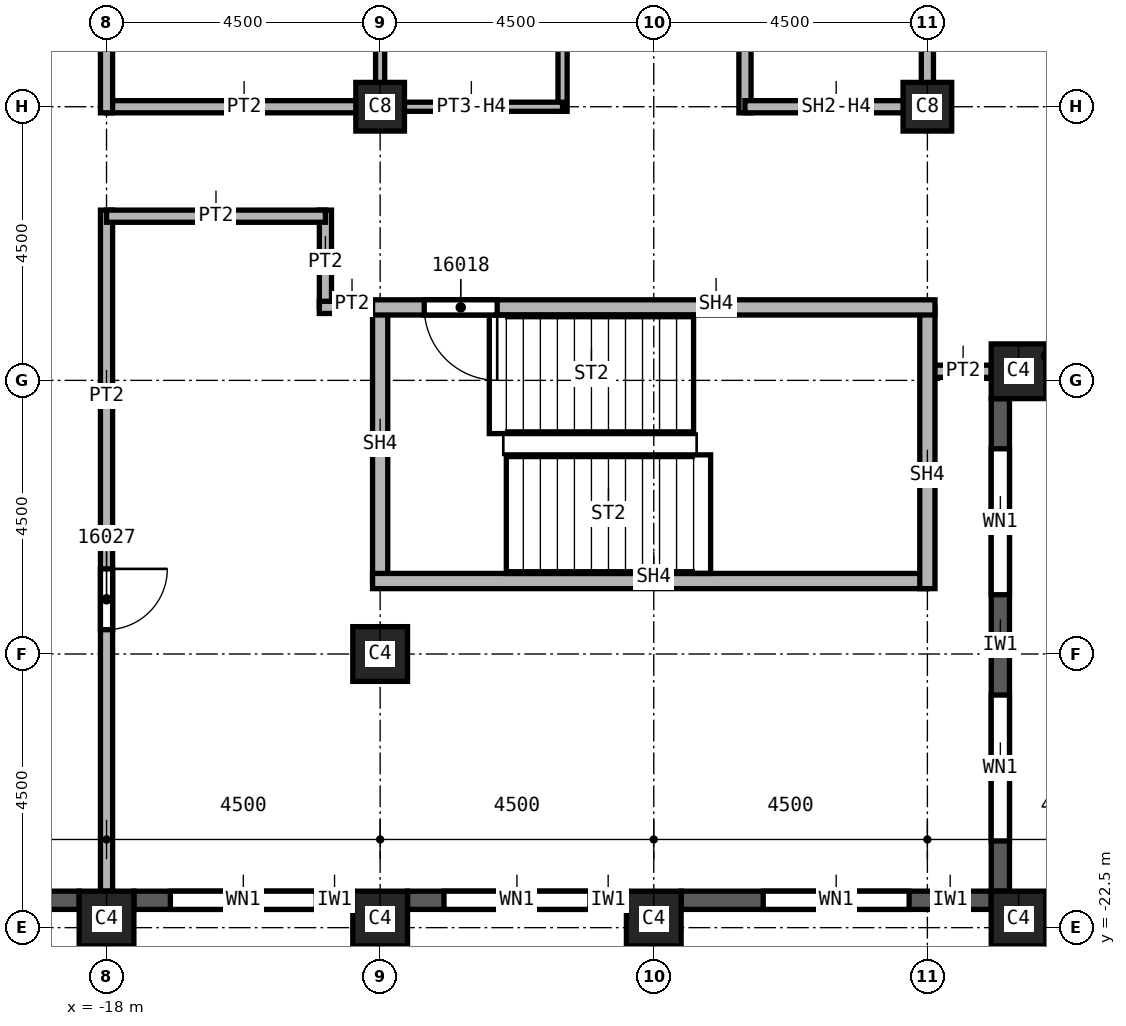
"""IFC4 building model, lengths in metres.
Left out: names, types, materials, properties, quantities, classifications, styles, units other than length and angle.
Written with IfcOpenShell. Run it as: python <this file> out.ifc"""

import sys

from ifc_helpers import new_model, si_unit, direction, frame, frame_2d, origin, origin_2d, place, context, subcontext, project, spatial, rectangle, extrude, element, fill, save


model = new_model("IFC4")
c1 = context("Model", 3, precision=1e-05, world=origin(), true_north=direction((0.0, 1.0)))
c2 = subcontext(c1, "Body", "Model", "MODEL_VIEW")
j1 = project(units=[si_unit("LENGTHUNIT", "METRE"), si_unit("PLANEANGLEUNIT", "RADIAN")], contexts=[c1])
p1 = place(None, origin())
s1 = spatial("IfcSite", under=j1, at=p1, CompositionType="ELEMENT")
p2 = place(p1, origin())
s2 = spatial("IfcBuilding", under=s1, at=p2, CompositionType="ELEMENT")
p3 = place(p2, frame((0.0, 0.0, 246.0)))
s3 = spatial("IfcBuildingStorey", under=s2, at=p3, CompositionType="ELEMENT", Elevation=246.0)
p4 = place(p3, frame((-13.5, -18.0, 0.0), z_axis=(0.0, 0.0, 1.0), x_axis=(1.0, 0.0, 0.0)))
e1 = element("IfcColumn", 1, at=p4, inside=s3, PredefinedType="COLUMN", context=c2, shape_type="SweptSolid", body=[
    extrude(rectangle(XDim=0.9, YDim=0.9, at=origin_2d()), origin(), (0.0, 0.0, 1.0), 3.72),
])
for number, where, z_axis, x_axis in (
    (2, (-4.5, -9.0, 0.0), (0.0, 0.0, 1.0), (1.0, 0.0, 0.0)),
    (3, (-13.5, -9.0, 0.0), (0.0, 0.0, 1.0), (1.0, 0.0, 0.0)),
):
    element("IfcColumn", number, at=place(p3, frame(where, z_axis=z_axis, x_axis=x_axis)), inside=s3, PredefinedType="COLUMN", context=c2, shape_type="SweptSolid", body=[
        extrude(rectangle(XDim=0.8, YDim=0.8, at=origin_2d()), origin(), (0.0, 0.0, 1.0), 3.72),
    ])
for number, where, z_axis, x_axis in (
    (4, (-3.0, -22.35, 0.0), (0.0, 0.0, 1.0), (1.0, 0.0, 0.0)),
    (5, (-9.0, -22.35, 0.0), (0.0, 0.0, 1.0), (1.0, 0.0, 0.0)),
    (6, (-13.5, -22.35, 0.0), (0.0, 0.0, 1.0), (1.0, 0.0, 0.0)),
    (7, (-18.0, -22.35, 0.0), (0.0, 0.0, 1.0), (1.0, 0.0, 0.0)),
    (8, (-3.0, -13.35, 0.0), (0.0, 0.0, 1.0), (1.0, 0.0, 0.0)),
):
    element("IfcColumn", number, at=place(p3, frame(where, z_axis=z_axis, x_axis=x_axis)), inside=s3, PredefinedType="COLUMN", context=c2, shape_type="SweptSolid", body=[
        extrude(rectangle(XDim=0.9, YDim=0.9, at=origin_2d()), origin(), (0.0, 0.0, 1.0), 3.72),
    ])
p5 = place(p3, frame((-22.05, -22.05, 0.0), z_axis=(0.0, 0.0, 1.0), x_axis=(1.0, 0.0, 0.0)))
e9 = element("IfcWall", 9, at=p5, inside=s3, PredefinedType="SOLIDWALL", context=c2, shape_type="SweptSolid", body=[
    extrude(rectangle(XDim=3.6, YDim=0.3, at=frame_2d((1.8, 0.0))), origin(), (0.0, 0.0, 1.0), 3.12),
])
p6 = place(p5, frame((0.775, 0.0, 0.8)))
e10 = element("IfcOpeningElement", 10, at=p6, cuts=e9, PredefinedType="OPENING", context=c2, shape_type="SweptSolid", body=[
    extrude(rectangle(XDim=1.0, YDim=1.95, at=frame_2d((0.5, 0.975))), frame((0.0, 0.15, 0.0), z_axis=(0.0, -1.0, 0.0), x_axis=(1.0, 0.0, 0.0)), (0.0, 0.0, 1.0), 0.3),
])
p7 = place(p5, frame((2.375, 0.0, 0.8)))
e11 = element("IfcOpeningElement", 11, at=p7, cuts=e9, PredefinedType="OPENING", context=c2, shape_type="SweptSolid", body=[
    extrude(rectangle(XDim=0.6, YDim=1.95, at=frame_2d((0.3, 0.975))), frame((0.0, 0.15, 0.0), z_axis=(0.0, -1.0, 0.0), x_axis=(1.0, 0.0, 0.0)), (0.0, 0.0, 1.0), 0.3),
])
p8 = place(p3, frame((-17.55, -22.05, 0.0), z_axis=(0.0, 0.0, 1.0), x_axis=(1.0, 0.0, 0.0)))
e12 = element("IfcWall", 12, at=p8, inside=s3, PredefinedType="SOLIDWALL", context=c2, shape_type="SweptSolid", body=[
    extrude(rectangle(XDim=3.6, YDim=0.3, at=frame_2d((1.8, 0.0))), origin(), (0.0, 0.0, 1.0), 3.12),
])
p9 = place(p8, frame((0.6, 0.0, 0.8)))
e13 = element("IfcOpeningElement", 13, at=p9, cuts=e12, PredefinedType="OPENING", context=c2, shape_type="SweptSolid", body=[
    extrude(rectangle(XDim=2.4, YDim=1.95, at=frame_2d((1.2, 0.975))), frame((0.0, 0.15, 0.0), z_axis=(0.0, -1.0, 0.0), x_axis=(1.0, 0.0, 0.0)), (0.0, 0.0, 1.0), 0.3),
])
p10 = place(p3, frame((-13.05, -22.05, 0.0), z_axis=(0.0, 0.0, 1.0), x_axis=(1.0, 0.0, 0.0)))
e14 = element("IfcWall", 14, at=p10, inside=s3, PredefinedType="SOLIDWALL", context=c2, shape_type="SweptSolid", body=[
    extrude(rectangle(XDim=3.6, YDim=0.3, at=frame_2d((1.8, 0.0))), origin(), (0.0, 0.0, 1.0), 3.12),
])
p11 = place(p10, frame((0.6, 0.0, 0.8)))
e15 = element("IfcOpeningElement", 15, at=p11, cuts=e14, PredefinedType="OPENING", context=c2, shape_type="SweptSolid", body=[
    extrude(rectangle(XDim=2.4, YDim=1.95, at=frame_2d((1.2, 0.975))), frame((0.0, 0.15, 0.0), z_axis=(0.0, -1.0, 0.0), x_axis=(1.0, 0.0, 0.0)), (0.0, 0.0, 1.0), 0.3),
])
p12 = place(p3, frame((-8.55, -22.05, 0.0), z_axis=(0.0, 0.0, 1.0), x_axis=(1.0, 0.0, 0.0)))
e16 = element("IfcWall", 16, at=p12, inside=s3, PredefinedType="SOLIDWALL", context=c2, shape_type="SweptSolid", body=[
    extrude(rectangle(XDim=5.1, YDim=0.3, at=frame_2d((2.55, 0.0))), origin(), (0.0, 0.0, 1.0), 3.12),
])
p13 = place(p12, frame((1.35, 0.0, 0.8)))
e17 = element("IfcOpeningElement", 17, at=p13, cuts=e16, PredefinedType="OPENING", context=c2, shape_type="SweptSolid", body=[
    extrude(rectangle(XDim=2.4, YDim=1.95, at=frame_2d((1.2, 0.975))), frame((0.0, 0.15, 0.0), z_axis=(0.0, -1.0, 0.0), x_axis=(1.0, 0.0, 0.0)), (0.0, 0.0, 1.0), 0.3),
])
p14 = place(p3, frame((-3.3, -21.9, 0.0), z_axis=(0.0, 0.0, 1.0), x_axis=(0.0, 1.0, 0.0)))
e18 = element("IfcWall", 18, at=p14, inside=s3, PredefinedType="SOLIDWALL", context=c2, shape_type="SweptSolid", body=[
    extrude(rectangle(XDim=8.1, YDim=0.3, at=frame_2d((4.05, 0.0))), origin(), (0.0, 0.0, 1.0), 3.12),
])
p15 = place(p14, frame((0.825, 0.0, 0.8)))
e19 = element("IfcOpeningElement", 19, at=p15, cuts=e18, PredefinedType="OPENING", context=c2, shape_type="SweptSolid", body=[
    extrude(rectangle(XDim=2.4, YDim=1.95, at=frame_2d((1.2, 0.975))), frame((0.0, 0.15, 0.0), z_axis=(0.0, -1.0, 0.0), x_axis=(1.0, 0.0, 0.0)), (0.0, 0.0, 1.0), 0.3),
])
p16 = place(p14, frame((4.875, 0.0, 0.8)))
e20 = element("IfcOpeningElement", 20, at=p16, cuts=e18, PredefinedType="OPENING", context=c2, shape_type="SweptSolid", body=[
    extrude(rectangle(XDim=2.4, YDim=1.95, at=frame_2d((1.2, 0.975))), frame((0.0, 0.15, 0.0), z_axis=(0.0, -1.0, 0.0), x_axis=(1.0, 0.0, 0.0)), (0.0, 0.0, 1.0), 0.3),
])
p17 = place(p3, frame((-18.0, -10.7, 0.0), z_axis=(0.0, 0.0, 1.0), x_axis=(0.0, -1.0, 0.0)))
e21 = element("IfcWall", 21, at=p17, inside=s3, PredefinedType="PARTITIONING", context=c2, shape_type="SweptSolid", body=[
    extrude(rectangle(XDim=11.2, YDim=0.2, at=frame_2d((5.6, 0.0))), origin(), (0.0, 0.0, 1.0), 3.72),
])
p18 = place(p17, frame((5.9, 0.0, 0.0)))
e22 = element("IfcOpeningElement", 22, at=p18, cuts=e21, PredefinedType="OPENING", context=c2, shape_type="SweptSolid", body=[
    extrude(rectangle(XDim=1.0, YDim=2.1, at=frame_2d((0.5, 1.05))), frame((0.0, 0.1, 0.0), z_axis=(0.0, -1.0, 0.0), x_axis=(1.0, 0.0, 0.0)), (0.0, 0.0, 1.0), 0.2),
])
p19 = place(p3, frame((-18.0, -9.0, 0.0), z_axis=(0.0, 0.0, 1.0), x_axis=(1.0, 0.0, 0.0)))
e23 = element("IfcWall", 23, at=p19, inside=s3, PredefinedType="PARTITIONING", context=c2, shape_type="SweptSolid", body=[
    extrude(rectangle(XDim=4.5, YDim=0.2, at=frame_2d((2.25, 0.0))), origin(), (0.0, 0.0, 1.0), 3.72),
])
p20 = place(p3, frame((-18.0, 9.1, 0.0), z_axis=(0.0, 0.0, 1.0), x_axis=(0.0, -1.0, 0.0)))
e24 = element("IfcWall", 24, at=p20, inside=s3, PredefinedType="PARTITIONING", context=c2, shape_type="SweptSolid", body=[
    extrude(rectangle(XDim=18.2, YDim=0.2, at=frame_2d((9.1, 0.0))), origin(), (0.0, 0.0, 1.0), 3.72),
])
p21 = place(p20, frame((11.05, 0.0, 0.0)))
e25 = element("IfcOpeningElement", 25, at=p21, cuts=e24, PredefinedType="OPENING", context=c2, shape_type="SweptSolid", body=[
    extrude(rectangle(XDim=1.0, YDim=2.1, at=frame_2d((0.5, 1.05))), frame((0.0, 0.1, 0.0), z_axis=(0.0, -1.0, 0.0), x_axis=(1.0, 0.0, 0.0)), (0.0, 0.0, 1.0), 0.2),
])
p22 = place(p20, frame((1.15, 0.0, 0.0)))
e26 = element("IfcOpeningElement", 26, at=p22, cuts=e24, PredefinedType="OPENING", context=c2, shape_type="SweptSolid", body=[
    extrude(rectangle(XDim=1.0, YDim=2.1, at=frame_2d((0.5, 1.05))), frame((0.0, 0.1, 0.0), z_axis=(0.0, -1.0, 0.0), x_axis=(1.0, 0.0, 0.0)), (0.0, 0.0, 1.0), 0.2),
])
p23 = place(p3, frame((-14.4, -12.3, 0.0), z_axis=(0.0, 0.0, 1.0), x_axis=(0.0, 1.0, 0.0)))
e27 = element("IfcWall", 27, at=p23, inside=s3, PredefinedType="PARTITIONING", context=c2, shape_type="SweptSolid", body=[
    extrude(rectangle(XDim=1.6, YDim=0.2, at=frame_2d((0.8, 0.0))), origin(), (0.0, 0.0, 1.0), 3.72),
])
p24 = place(p3, frame((-14.4, -10.8, 0.0), z_axis=(0.0, 0.0, 1.0), x_axis=(-1.0, 0.0, 0.0)))
e28 = element("IfcWall", 28, at=p24, inside=s3, PredefinedType="PARTITIONING", context=c2, shape_type="SweptSolid", body=[
    extrude(rectangle(XDim=3.6, YDim=0.2, at=frame_2d((1.8, 0.0))), origin(), (0.0, 0.0, 1.0), 3.72),
])
p25 = place(p3, frame((-13.375, -12.3, 0.0), z_axis=(0.0, 0.0, 1.0), x_axis=(-1.0, 0.0, 0.0)))
e29 = element("IfcWall", 29, at=p25, inside=s3, PredefinedType="PARTITIONING", context=c2, shape_type="SweptSolid", body=[
    extrude(rectangle(XDim=1.125, YDim=0.2, at=frame_2d((0.562, 0.0))), origin(), (0.0, 0.0, 1.0), 3.72),
])
p26 = place(p3, frame((-3.45, -13.35, 0.0), z_axis=(0.0, 0.0, 1.0), x_axis=(-1.0, 0.0, 0.0)))
e30 = element("IfcWall", 30, at=p26, inside=s3, PredefinedType="PARTITIONING", context=c2, shape_type="SweptSolid", body=[
    extrude(rectangle(XDim=1.05, YDim=0.2, at=frame_2d((0.525, 0.0))), origin(), (0.0, 0.0, 1.0), 3.72),
])
p27 = place(p3, frame((-7.5, -9.1, 0.0), z_axis=(0.0, 0.0, 1.0), x_axis=(0.0, 1.0, 0.0)))
e31 = element("IfcWall", 31, at=p27, inside=s3, PredefinedType="SOLIDWALL", context=c2, shape_type="SweptSolid", body=[
    extrude(rectangle(XDim=6.225, YDim=0.2, at=frame_2d((3.113, 0.0))), origin(), (0.0, 0.0, 1.0), 3.72),
])
p28 = place(p3, frame((-4.5, -9.0, 0.0), z_axis=(0.0, 0.0, 1.0), x_axis=(-1.0, 0.0, 0.0)))
e32 = element("IfcWall", 32, at=p28, inside=s3, PredefinedType="SOLIDWALL", context=c2, shape_type="SweptSolid", body=[
    extrude(rectangle(XDim=3.0, YDim=0.2, at=frame_2d((1.5, 0.0))), origin(), (0.0, 0.0, 1.0), 3.042),
])
p29 = place(p3, frame((-4.5, 0.0, 0.0), z_axis=(0.0, 0.0, 1.0), x_axis=(0.0, -1.0, 0.0)))
e33 = element("IfcWall", 33, at=p29, inside=s3, PredefinedType="SOLIDWALL", context=c2, shape_type="SweptSolid", body=[
    extrude(rectangle(XDim=9.1, YDim=0.2, at=frame_2d((4.55, 0.0))), origin(), (0.0, 0.0, 1.0), 3.042),
])
p30 = place(p29, frame((6.25, 0.0, 0.0)))
e34 = element("IfcOpeningElement", 34, at=p30, cuts=e33, PredefinedType="OPENING", context=c2, shape_type="SweptSolid", body=[
    extrude(rectangle(XDim=1.1, YDim=2.1, at=frame_2d((0.55, 1.05))), frame((0.0, 0.1, 0.0), z_axis=(0.0, -1.0, 0.0), x_axis=(1.0, 0.0, 0.0)), (0.0, 0.0, 1.0), 0.2),
])
p31 = place(p29, frame((4.6, 0.0, 0.0)))
e35 = element("IfcOpeningElement", 35, at=p31, cuts=e33, PredefinedType="OPENING", context=c2, shape_type="SweptSolid", body=[
    extrude(rectangle(XDim=1.1, YDim=2.1, at=frame_2d((0.55, 1.05))), frame((0.0, 0.1, 0.0), z_axis=(0.0, -1.0, 0.0), x_axis=(1.0, 0.0, 0.0)), (0.0, 0.0, 1.0), 0.2),
])
p32 = place(p3, frame((-13.5, -16.8, 0.0), z_axis=(0.0, 0.0, 1.0), x_axis=(0.0, 1.0, 0.0)))
e36 = element("IfcWall", 36, at=p32, inside=s3, PredefinedType="SOLIDWALL", context=c2, shape_type="SweptSolid", body=[
    extrude(rectangle(XDim=4.5, YDim=0.25, at=frame_2d((2.25, 0.0))), origin(), (0.0, 0.0, 1.0), 3.72),
])
p33 = place(p3, frame((-4.5, -16.8, 0.0), z_axis=(0.0, 0.0, 1.0), x_axis=(-1.0, 0.0, 0.0)))
e37 = element("IfcWall", 37, at=p33, inside=s3, PredefinedType="SOLIDWALL", context=c2, shape_type="SweptSolid", body=[
    extrude(rectangle(XDim=9.125, YDim=0.25, at=frame_2d((4.562, 0.0))), origin(), (0.0, 0.0, 1.0), 3.72),
])
p34 = place(p3, frame((-4.5, -12.3, 0.0), z_axis=(0.0, 0.0, 1.0), x_axis=(0.0, -1.0, 0.0)))
e38 = element("IfcWall", 38, at=p34, inside=s3, PredefinedType="SOLIDWALL", context=c2, shape_type="SweptSolid", body=[
    extrude(rectangle(XDim=4.625, YDim=0.25, at=frame_2d((2.312, 0.0))), origin(), (0.0, 0.0, 1.0), 3.72),
])
p35 = place(p3, frame((-4.375, -12.3, 0.0), z_axis=(0.0, 0.0, 1.0), x_axis=(-1.0, 0.0, 0.0)))
e39 = element("IfcWall", 39, at=p35, inside=s3, PredefinedType="SOLIDWALL", context=c2, shape_type="SweptSolid", body=[
    extrude(rectangle(XDim=9.25, YDim=0.25, at=frame_2d((4.625, 0.0))), origin(), (0.0, 0.0, 1.0), 3.72),
])
p36 = place(p35, frame((7.2, 0.0, 0.0)))
e40 = element("IfcOpeningElement", 40, at=p36, cuts=e39, PredefinedType="OPENING", context=c2, shape_type="SweptSolid", body=[
    extrude(rectangle(XDim=1.2, YDim=2.1, at=frame_2d((0.6, 1.05))), frame((0.0, 0.125, 0.0), z_axis=(0.0, -1.0, 0.0), x_axis=(1.0, 0.0, 0.0)), (0.0, 0.0, 1.0), 0.25),
])
p37 = place(p3, frame((-13.5, -9.1, 0.0), z_axis=(0.0, 0.0, 1.0), x_axis=(0.0, 1.0, 0.0)))
e41 = element("IfcWall", 41, at=p37, inside=s3, PredefinedType="PARTITIONING", context=c2, shape_type="SweptSolid", body=[
    extrude(rectangle(XDim=4.1, YDim=0.15, at=frame_2d((2.05, 0.0))), origin(), (0.0, 0.0, 1.0), 3.042),
])
p38 = place(p3, frame((-10.5, -9.075, 0.0), z_axis=(0.0, 0.0, 1.0), x_axis=(0.0, 1.0, 0.0)))
e42 = element("IfcWall", 42, at=p38, inside=s3, PredefinedType="PARTITIONING", context=c2, shape_type="SweptSolid", body=[
    extrude(rectangle(XDim=4.15, YDim=0.15, at=frame_2d((2.075, 0.0))), origin(), (0.0, 0.0, 1.0), 3.72),
])
p39 = place(p38, frame((2.5, 0.0, 0.0)))
e43 = element("IfcOpeningElement", 43, at=p39, cuts=e42, PredefinedType="OPENING", context=c2, shape_type="SweptSolid", body=[
    extrude(rectangle(XDim=0.9, YDim=2.1, at=frame_2d((0.45, 1.05))), frame((0.0, 0.075, 0.0), z_axis=(0.0, -1.0, 0.0), x_axis=(1.0, 0.0, 0.0)), (0.0, 0.0, 1.0), 0.15),
])
p40 = place(p3, frame((-10.5, -9.0, 0.0), z_axis=(0.0, 0.0, 1.0), x_axis=(-1.0, 0.0, 0.0)))
e44 = element("IfcWall", 44, at=p40, inside=s3, PredefinedType="PARTITIONING", context=c2, shape_type="SweptSolid", body=[
    extrude(rectangle(XDim=3.075, YDim=0.15, at=frame_2d((1.538, 0.0))), origin(), (0.0, 0.0, 1.0), 3.042),
])
p41 = place(p9, origin())
e45 = element("IfcWindow", 45, at=p41, inside=s3, PartitioningType="SINGLE_PANEL", PredefinedType="WINDOW", context=c2, shape_type="SweptSolid", body=[
    extrude(rectangle(XDim=2.4, YDim=1.95, at=frame_2d((1.2, 0.975))), frame((0.0, 0.03, 0.0), z_axis=(0.0, -1.0, 0.0), x_axis=(1.0, 0.0, 0.0)), (0.0, 0.0, 1.0), 0.06),
])
fill(e13, e45)
p42 = place(p11, origin())
e46 = element("IfcWindow", 46, at=p42, inside=s3, PartitioningType="SINGLE_PANEL", PredefinedType="WINDOW", context=c2, shape_type="SweptSolid", body=[
    extrude(rectangle(XDim=2.4, YDim=1.95, at=frame_2d((1.2, 0.975))), frame((0.0, 0.03, 0.0), z_axis=(0.0, -1.0, 0.0), x_axis=(1.0, 0.0, 0.0)), (0.0, 0.0, 1.0), 0.06),
])
fill(e15, e46)
p43 = place(p13, origin())
e47 = element("IfcWindow", 47, at=p43, inside=s3, PartitioningType="SINGLE_PANEL", PredefinedType="WINDOW", context=c2, shape_type="SweptSolid", body=[
    extrude(rectangle(XDim=2.4, YDim=1.95, at=frame_2d((1.2, 0.975))), frame((0.0, 0.03, 0.0), z_axis=(0.0, -1.0, 0.0), x_axis=(1.0, 0.0, 0.0)), (0.0, 0.0, 1.0), 0.06),
])
fill(e17, e47)
p44 = place(p15, origin())
e48 = element("IfcWindow", 48, at=p44, inside=s3, PartitioningType="SINGLE_PANEL", PredefinedType="WINDOW", context=c2, shape_type="SweptSolid", body=[
    extrude(rectangle(XDim=2.4, YDim=1.95, at=frame_2d((1.2, 0.975))), frame((0.0, 0.03, 0.0), z_axis=(0.0, -1.0, 0.0), x_axis=(1.0, 0.0, 0.0)), (0.0, 0.0, 1.0), 0.06),
])
fill(e19, e48)
p45 = place(p16, origin())
e49 = element("IfcWindow", 49, at=p45, inside=s3, PartitioningType="SINGLE_PANEL", PredefinedType="WINDOW", context=c2, shape_type="SweptSolid", body=[
    extrude(rectangle(XDim=2.4, YDim=1.95, at=frame_2d((1.2, 0.975))), frame((0.0, 0.03, 0.0), z_axis=(0.0, -1.0, 0.0), x_axis=(1.0, 0.0, 0.0)), (0.0, 0.0, 1.0), 0.06),
])
fill(e20, e49)
p46 = place(p36, origin())
e50 = element("IfcDoor", 50, at=p46, inside=s3, OperationType="SINGLE_SWING_LEFT", PredefinedType="DOOR", context=c2, shape_type="SweptSolid", body=[
    extrude(rectangle(XDim=1.2, YDim=2.1, at=frame_2d((0.6, 1.05))), frame((0.0, 0.025, 0.0), z_axis=(0.0, -1.0, 0.0), x_axis=(1.0, 0.0, 0.0)), (0.0, 0.0, 1.0), 0.05),
])
fill(e40, e50)
p47 = place(p18, origin())
e51 = element("IfcDoor", 51, at=p47, inside=s3, OperationType="SINGLE_SWING_RIGHT", PredefinedType="DOOR", context=c2, shape_type="SweptSolid", body=[
    extrude(rectangle(XDim=1.0, YDim=2.1, at=frame_2d((0.5, 1.05))), frame((0.0, 0.025, 0.0), z_axis=(0.0, -1.0, 0.0), x_axis=(1.0, 0.0, 0.0)), (0.0, 0.0, 1.0), 0.05),
])
fill(e22, e51)
save(model, sys.argv[1])
